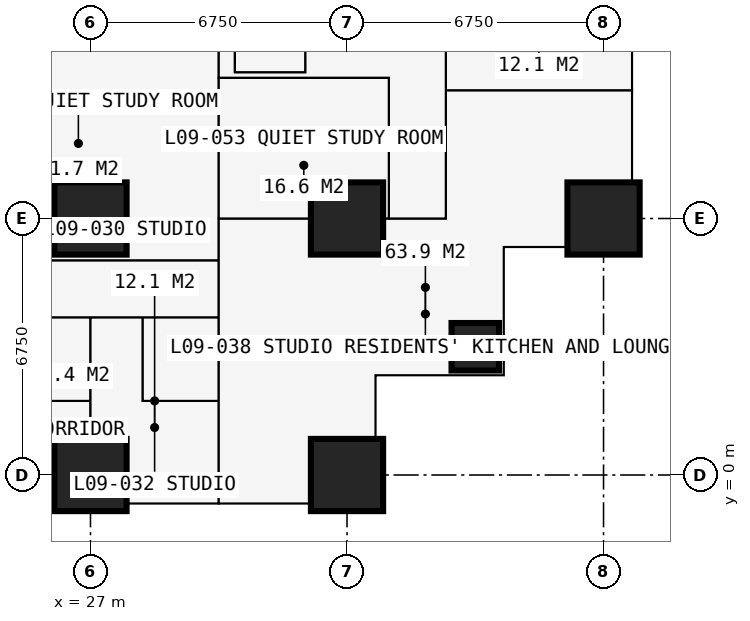
"""IFC4 building model, lengths in metres.
Left out: names, types, materials, properties, quantities, classifications, styles, units other than length and angle.
Written with IfcOpenShell. Run it as: python <this file> out.ifc"""

import sys

from ifc_helpers import new_model, si_unit, direction, frame, frame_2d, origin, origin_2d, place, context, subcontext, project, spatial, rectangle, extrude, element, fill, save


model = new_model("IFC4")
c1 = context("Model", 3, precision=1e-05, world=origin(), true_north=direction((0.0, 1.0)))
c2 = subcontext(c1, "Body", "Model", "MODEL_VIEW")
j1 = project(units=[si_unit("LENGTHUNIT", "METRE"), si_unit("PLANEANGLEUNIT", "RADIAN")], contexts=[c1])
p1 = place(None, origin())
s1 = spatial("IfcSite", under=j1, at=p1, CompositionType="ELEMENT")
p2 = place(p1, origin())
s2 = spatial("IfcBuilding", under=s1, at=p2, CompositionType="ELEMENT")
p3 = place(p2, frame((0.0, 0.0, 36.0)))
s3 = spatial("IfcBuildingStorey", under=s2, at=p3, CompositionType="ELEMENT", Elevation=36.0)
for number, where, z_axis, x_axis in (
    (1, (27.0, 0.0, 0.0), (0.0, 0.0, 1.0), (1.0, 0.0, 0.0)),
    (2, (27.0, 6.75, 0.0), (0.0, 0.0, 1.0), (1.0, 0.0, 0.0)),
    (3, (33.75, 0.0, 0.0), (0.0, 0.0, 1.0), (1.0, 0.0, 0.0)),
    (4, (33.75, 6.75, 0.0), (0.0, 0.0, 1.0), (1.0, 0.0, 0.0)),
):
    element("IfcColumn", number, at=place(p3, frame(where, z_axis=z_axis, x_axis=x_axis)), inside=s3, PredefinedType="COLUMN", context=c2, shape_type="SweptSolid", body=[
        extrude(rectangle(XDim=1.9, YDim=1.9, at=origin_2d()), origin(), (0.0, 0.0, 1.0), 3.6),
    ])
p4 = place(p3, frame((37.125, 3.375, 0.0), z_axis=(0.0, 0.0, 1.0), x_axis=(1.0, 0.0, 0.0)))
e5 = element("IfcColumn", 5, at=p4, inside=s3, PredefinedType="COLUMN", context=c2, shape_type="SweptSolid", body=[
    extrude(rectangle(XDim=1.25, YDim=1.25, at=origin_2d()), origin(), (0.0, 0.0, 1.0), 3.6),
])
p5 = place(p3, frame((40.5, 6.75, 0.0), z_axis=(0.0, 0.0, 1.0), x_axis=(1.0, 0.0, 0.0)))
e6 = element("IfcColumn", 6, at=p5, inside=s3, PredefinedType="COLUMN", context=c2, shape_type="SweptSolid", body=[
    extrude(rectangle(XDim=1.9, YDim=1.9, at=origin_2d()), origin(), (0.0, 0.0, 1.0), 3.6),
])
p6 = place(p3, frame((27.0, -0.75, 0.0), z_axis=(0.0, 0.0, 1.0), x_axis=(-1.0, 0.0, 0.0)))
e7 = element("IfcWall", 7, at=p6, inside=s3, PredefinedType="SOLIDWALL", context=c2, shape_type="SweptSolid", body=[
    extrude(rectangle(XDim=6.75, YDim=0.15, at=frame_2d((3.375, 0.0))), origin(), (0.0, 0.0, 1.0), 3.375),
])
p7 = place(p6, frame((0.996, 0.0, 0.0)))
e8 = element("IfcOpeningElement", 8, at=p7, cuts=e7, PredefinedType="OPENING", context=c2, shape_type="SweptSolid", body=[
    extrude(rectangle(XDim=1.0, YDim=2.2, at=frame_2d((0.5, 1.1))), frame((0.0, 0.085, 0.0), z_axis=(0.0, -1.0, 0.0), x_axis=(1.0, 0.0, 0.0)), (0.0, 0.0, 1.0), 0.17),
])
p8 = place(p6, frame((2.042, 0.0, 0.9)))
e9 = element("IfcOpeningElement", 9, at=p8, cuts=e7, PredefinedType="OPENING", context=c2, shape_type="SweptSolid", body=[
    extrude(rectangle(XDim=1.2, YDim=1.8, at=frame_2d((0.6, 0.9))), frame((0.0, 0.085, 0.0), z_axis=(0.0, -1.0, 0.0), x_axis=(1.0, 0.0, 0.0)), (0.0, 0.0, 1.0), 0.17),
])
p9 = place(p6, frame((4.754, 0.0, 0.0)))
e10 = element("IfcOpeningElement", 10, at=p9, cuts=e7, PredefinedType="OPENING", context=c2, shape_type="SweptSolid", body=[
    extrude(rectangle(XDim=1.0, YDim=2.2, at=frame_2d((0.5, 1.1))), frame((0.0, 0.085, 0.0), z_axis=(0.0, -1.0, 0.0), x_axis=(1.0, 0.0, 0.0)), (0.0, 0.0, 1.0), 0.17),
])
p10 = place(p6, frame((3.508, 0.0, 0.9)))
e11 = element("IfcOpeningElement", 11, at=p10, cuts=e7, PredefinedType="OPENING", context=c2, shape_type="SweptSolid", body=[
    extrude(rectangle(XDim=1.2, YDim=1.8, at=frame_2d((0.6, 0.9))), frame((0.0, 0.085, 0.0), z_axis=(0.0, -1.0, 0.0), x_axis=(1.0, 0.0, 0.0)), (0.0, 0.0, 1.0), 0.17),
])
p11 = place(p3, frame((34.5, -0.75, 0.0), z_axis=(0.0, 0.0, 1.0), x_axis=(0.0, 1.0, 0.0)))
e12 = element("IfcWall", 12, at=p11, inside=s3, PredefinedType="SOLIDWALL", context=c2, shape_type="SweptSolid", body=[
    extrude(rectangle(XDim=3.375, YDim=0.3, at=frame_2d((1.688, 0.0))), origin(), (0.0, 0.0, 1.0), 3.375),
])
p12 = place(p11, frame((1.857, 0.0, 0.9)))
e13 = element("IfcOpeningElement", 13, at=p12, cuts=e12, PredefinedType="OPENING", context=c2, shape_type="SweptSolid", body=[
    extrude(rectangle(XDim=1.2, YDim=1.8, at=frame_2d((0.6, 0.9))), frame((0.0, 0.16, 0.0), z_axis=(0.0, -1.0, 0.0), x_axis=(1.0, 0.0, 0.0)), (0.0, 0.0, 1.0), 0.32),
])
p13 = place(p3, frame((34.5, 2.625, 0.0), z_axis=(0.0, 0.0, 1.0), x_axis=(1.0, 0.0, 0.0)))
e14 = element("IfcWall", 14, at=p13, inside=s3, PredefinedType="SOLIDWALL", context=c2, shape_type="SweptSolid", body=[
    extrude(rectangle(XDim=3.375, YDim=0.3, at=frame_2d((1.688, 0.0))), origin(), (0.0, 0.0, 1.0), 3.375),
])
p14 = place(p13, frame((0.788, 0.0, 0.6)))
e15 = element("IfcOpeningElement", 15, at=p14, cuts=e14, PredefinedType="OPENING", context=c2, shape_type="SweptSolid", body=[
    extrude(rectangle(XDim=1.8, YDim=2.1, at=frame_2d((0.9, 1.05))), frame((0.0, 0.16, 0.0), z_axis=(0.0, -1.0, 0.0), x_axis=(1.0, 0.0, 0.0)), (0.0, 0.0, 1.0), 0.32),
])
p15 = place(p3, frame((37.875, 2.625, 0.0), z_axis=(0.0, 0.0, 1.0), x_axis=(0.0, 1.0, 0.0)))
e16 = element("IfcWall", 16, at=p15, inside=s3, PredefinedType="SOLIDWALL", context=c2, shape_type="SweptSolid", body=[
    extrude(rectangle(XDim=3.375, YDim=0.3, at=frame_2d((1.688, 0.0))), origin(), (0.0, 0.0, 1.0), 3.375),
])
p16 = place(p15, frame((0.788, 0.0, 0.6)))
e17 = element("IfcOpeningElement", 17, at=p16, cuts=e16, PredefinedType="OPENING", context=c2, shape_type="SweptSolid", body=[
    extrude(rectangle(XDim=1.8, YDim=2.1, at=frame_2d((0.9, 1.05))), frame((0.0, 0.16, 0.0), z_axis=(0.0, -1.0, 0.0), x_axis=(1.0, 0.0, 0.0)), (0.0, 0.0, 1.0), 0.32),
])
p17 = place(p3, frame((37.875, 6.0, 0.0), z_axis=(0.0, 0.0, 1.0), x_axis=(1.0, 0.0, 0.0)))
e18 = element("IfcWall", 18, at=p17, inside=s3, PredefinedType="SOLIDWALL", context=c2, shape_type="SweptSolid", body=[
    extrude(rectangle(XDim=3.375, YDim=0.3, at=frame_2d((1.688, 0.0))), origin(), (0.0, 0.0, 1.0), 3.375),
])
p18 = place(p17, frame((0.317, 0.0, 0.9)))
e19 = element("IfcOpeningElement", 19, at=p18, cuts=e18, PredefinedType="OPENING", context=c2, shape_type="SweptSolid", body=[
    extrude(rectangle(XDim=1.2, YDim=1.8, at=frame_2d((0.6, 0.9))), frame((0.0, 0.16, 0.0), z_axis=(0.0, -1.0, 0.0), x_axis=(1.0, 0.0, 0.0)), (0.0, 0.0, 1.0), 0.32),
])
p19 = place(p3, frame((6.75, 4.15, 0.0), z_axis=(0.0, 0.0, 1.0), x_axis=(1.0, 0.0, 0.0)))
e20 = element("IfcWall", 20, at=p19, inside=s3, PredefinedType="PARTITIONING", context=c2, shape_type="SweptSolid", body=[
    extrude(rectangle(XDim=23.625, YDim=0.1, at=frame_2d((11.812, 0.0))), origin(), (0.0, 0.0, 1.0), 3.375),
])
p20 = place(p19, frame((0.2, 0.0, 0.0)))
e21 = element("IfcOpeningElement", 21, at=p20, cuts=e20, PredefinedType="OPENING", context=c2, shape_type="SweptSolid", body=[
    extrude(rectangle(XDim=0.95, YDim=2.2, at=frame_2d((0.475, 1.1))), frame((0.0, 0.06, 0.0), z_axis=(0.0, -1.0, 0.0), x_axis=(1.0, 0.0, 0.0)), (0.0, 0.0, 1.0), 0.12),
])
p21 = place(p19, frame((3.625, 0.0, 0.0)))
e22 = element("IfcOpeningElement", 22, at=p21, cuts=e20, PredefinedType="OPENING", context=c2, shape_type="SweptSolid", body=[
    extrude(rectangle(XDim=0.95, YDim=2.2, at=frame_2d((0.475, 1.1))), frame((0.0, 0.06, 0.0), z_axis=(0.0, -1.0, 0.0), x_axis=(1.0, 0.0, 0.0)), (0.0, 0.0, 1.0), 0.12),
])
p22 = place(p19, frame((7.0, 0.0, 0.0)))
e23 = element("IfcOpeningElement", 23, at=p22, cuts=e20, PredefinedType="OPENING", context=c2, shape_type="SweptSolid", body=[
    extrude(rectangle(XDim=0.95, YDim=2.2, at=frame_2d((0.475, 1.1))), frame((0.0, 0.06, 0.0), z_axis=(0.0, -1.0, 0.0), x_axis=(1.0, 0.0, 0.0)), (0.0, 0.0, 1.0), 0.12),
])
p23 = place(p19, frame((10.325, 0.0, 0.0)))
e24 = element("IfcOpeningElement", 24, at=p23, cuts=e20, PredefinedType="OPENING", context=c2, shape_type="SweptSolid", body=[
    extrude(rectangle(XDim=0.95, YDim=2.2, at=frame_2d((0.475, 1.1))), frame((0.0, 0.06, 0.0), z_axis=(0.0, -1.0, 0.0), x_axis=(1.0, 0.0, 0.0)), (0.0, 0.0, 1.0), 0.12),
])
p24 = place(p19, frame((13.75, 0.0, 0.0)))
e25 = element("IfcOpeningElement", 25, at=p24, cuts=e20, PredefinedType="OPENING", context=c2, shape_type="SweptSolid", body=[
    extrude(rectangle(XDim=0.95, YDim=2.2, at=frame_2d((0.475, 1.1))), frame((0.0, 0.06, 0.0), z_axis=(0.0, -1.0, 0.0), x_axis=(1.0, 0.0, 0.0)), (0.0, 0.0, 1.0), 0.12),
])
p25 = place(p19, frame((17.125, 0.0, 0.0)))
e26 = element("IfcOpeningElement", 26, at=p25, cuts=e20, PredefinedType="OPENING", context=c2, shape_type="SweptSolid", body=[
    extrude(rectangle(XDim=0.95, YDim=2.2, at=frame_2d((0.475, 1.1))), frame((0.0, 0.06, 0.0), z_axis=(0.0, -1.0, 0.0), x_axis=(1.0, 0.0, 0.0)), (0.0, 0.0, 1.0), 0.12),
])
p26 = place(p19, frame((20.5, 0.0, 0.0)))
e27 = element("IfcOpeningElement", 27, at=p26, cuts=e20, PredefinedType="OPENING", context=c2, shape_type="SweptSolid", body=[
    extrude(rectangle(XDim=0.95, YDim=2.2, at=frame_2d((0.475, 1.1))), frame((0.0, 0.06, 0.0), z_axis=(0.0, -1.0, 0.0), x_axis=(1.0, 0.0, 0.0)), (0.0, 0.0, 1.0), 0.12),
])
p27 = place(p3, frame((22.988, 5.65, 0.0), z_axis=(0.0, 0.0, 1.0), x_axis=(1.0, 0.0, 0.0)))
e28 = element("IfcWall", 28, at=p27, inside=s3, PredefinedType="PARTITIONING", context=c2, shape_type="SweptSolid", body=[
    extrude(rectangle(XDim=7.387, YDim=0.15, at=frame_2d((3.694, 0.0))), origin(), (0.0, 0.0, 1.0), 3.375),
])
p28 = place(p27, frame((2.1, 0.0, 0.0)))
e29 = element("IfcOpeningElement", 29, at=p28, cuts=e28, PredefinedType="OPENING", context=c2, shape_type="SweptSolid", body=[
    extrude(rectangle(XDim=0.95, YDim=2.2, at=frame_2d((0.475, 1.1))), frame((0.0, 0.085, 0.0), z_axis=(0.0, -1.0, 0.0), x_axis=(1.0, 0.0, 0.0)), (0.0, 0.0, 1.0), 0.17),
])
p29 = place(p3, frame((25.0, 1.95, 0.0), z_axis=(0.0, 0.0, 1.0), x_axis=(1.0, 0.0, 0.0)))
e30 = element("IfcWall", 30, at=p29, inside=s3, PredefinedType="PARTITIONING", context=c2, shape_type="SweptSolid", body=[
    extrude(rectangle(XDim=2.0, YDim=0.1, at=frame_2d((1.0, 0.0))), origin(), (0.0, 0.0, 1.0), 3.375),
])
p30 = place(p3, frame((27.0, -0.734, 0.0), z_axis=(0.0, 0.0, 1.0), x_axis=(0.0, 1.0, 0.0)))
e31 = element("IfcWall", 31, at=p30, inside=s3, PredefinedType="PARTITIONING", context=c2, shape_type="SweptSolid", body=[
    extrude(rectangle(XDim=4.884, YDim=0.175, at=frame_2d((2.442, 0.0))), origin(), (0.0, 0.0, 1.0), 2.877),
])
p31 = place(p3, frame((28.375, 1.95, 0.0), z_axis=(0.0, 0.0, 1.0), x_axis=(0.0, 1.0, 0.0)))
e32 = element("IfcWall", 32, at=p31, inside=s3, PredefinedType="PARTITIONING", context=c2, shape_type="SweptSolid", body=[
    extrude(rectangle(XDim=2.2, YDim=0.1, at=frame_2d((1.1, 0.0))), origin(), (0.0, 0.0, 1.0), 3.375),
])
p32 = place(p31, frame((0.65, 0.0, 0.0)))
e33 = element("IfcOpeningElement", 33, at=p32, cuts=e32, PredefinedType="OPENING", context=c2, shape_type="SweptSolid", body=[
    extrude(rectangle(XDim=0.9, YDim=2.2, at=frame_2d((0.45, 1.1))), frame((0.0, 0.06, 0.0), z_axis=(0.0, -1.0, 0.0), x_axis=(1.0, 0.0, 0.0)), (0.0, 0.0, 1.0), 0.12),
])
p33 = place(p3, frame((28.375, 1.95, 0.0), z_axis=(0.0, 0.0, 1.0), x_axis=(1.0, 0.0, 0.0)))
e34 = element("IfcWall", 34, at=p33, inside=s3, PredefinedType="PARTITIONING", context=c2, shape_type="SweptSolid", body=[
    extrude(rectangle(XDim=2.0, YDim=0.1, at=frame_2d((1.0, 0.0))), origin(), (0.0, 0.0, 1.0), 3.375),
])
p34 = place(p3, frame((30.375, -0.734, 0.0), z_axis=(0.0, 0.0, 1.0), x_axis=(0.0, 1.0, 0.0)))
e35 = element("IfcWall", 35, at=p34, inside=s3, PredefinedType="PARTITIONING", context=c2, shape_type="SweptSolid", body=[
    extrude(rectangle(XDim=12.034, YDim=0.15, at=frame_2d((6.017, 0.0))), origin(), (0.0, 0.0, 1.0), 3.375),
])
p35 = place(p34, frame((5.134, 0.0, 0.0)))
e36 = element("IfcOpeningElement", 36, at=p35, cuts=e35, PredefinedType="OPENING", context=c2, shape_type="SweptSolid", body=[
    extrude(rectangle(XDim=1.0, YDim=2.2, at=frame_2d((0.5, 1.1))), frame((0.0, 0.085, 0.0), z_axis=(0.0, -1.0, 0.0), x_axis=(1.0, 0.0, 0.0)), (0.0, 0.0, 1.0), 0.17),
])
p36 = place(p3, frame((30.375, 6.75, 0.0), z_axis=(0.0, 0.0, 1.0), x_axis=(1.0, 0.0, 0.0)))
e37 = element("IfcWall", 37, at=p36, inside=s3, PredefinedType="PARTITIONING", context=c2, shape_type="SweptSolid", body=[
    extrude(rectangle(XDim=5.975, YDim=0.15, at=frame_2d((2.988, 0.0))), origin(), (0.0, 0.0, 1.0), 2.877),
])
p37 = place(p3, frame((30.375, 10.45, 0.0), z_axis=(0.0, 0.0, 1.0), x_axis=(1.0, 0.0, 0.0)))
e38 = element("IfcWall", 38, at=p37, inside=s3, PredefinedType="PARTITIONING", context=c2, shape_type="SweptSolid", body=[
    extrude(rectangle(XDim=4.475, YDim=0.15, at=frame_2d((2.238, 0.0))), origin(), (0.0, 0.0, 1.0), 3.375),
])
p38 = place(p37, frame((2.35, 0.0, 0.0)))
e39 = element("IfcOpeningElement", 39, at=p38, cuts=e38, PredefinedType="OPENING", context=c2, shape_type="SweptSolid", body=[
    extrude(rectangle(XDim=0.95, YDim=2.2, at=frame_2d((0.475, 1.1))), frame((0.0, 0.085, 0.0), z_axis=(0.0, -1.0, 0.0), x_axis=(1.0, 0.0, 0.0)), (0.0, 0.0, 1.0), 0.17),
])
p39 = place(p3, frame((30.8, 10.6, 0.0), z_axis=(0.0, 0.0, 1.0), x_axis=(0.0, 1.0, 0.0)))
e40 = element("IfcWall", 40, at=p39, inside=s3, PredefinedType="PARTITIONING", context=c2, shape_type="SweptSolid", body=[
    extrude(rectangle(XDim=0.7, YDim=0.15, at=frame_2d((0.35, 0.0))), origin(), (0.0, 0.0, 1.0), 3.375),
])
p40 = place(p3, frame((30.8, 10.6, 0.0), z_axis=(0.0, 0.0, 1.0), x_axis=(1.0, 0.0, 0.0)))
e41 = element("IfcWall", 41, at=p40, inside=s3, PredefinedType="PARTITIONING", context=c2, shape_type="SweptSolid", body=[
    extrude(rectangle(XDim=1.85, YDim=0.15, at=frame_2d((0.925, 0.0))), origin(), (0.0, 0.0, 1.0), 3.375),
])
p41 = place(p3, frame((32.65, 10.6, 0.0), z_axis=(0.0, 0.0, 1.0), x_axis=(0.0, 1.0, 0.0)))
e42 = element("IfcWall", 42, at=p41, inside=s3, PredefinedType="SHEAR", context=c2, shape_type="SweptSolid", body=[
    extrude(rectangle(XDim=9.3, YDim=0.1, at=frame_2d((4.65, 0.0))), origin(), (0.0, 0.0, 1.0), 3.375),
])
p42 = place(p41, frame((0.5, 0.0, 0.0)))
e43 = element("IfcOpeningElement", 43, at=p42, cuts=e42, PredefinedType="OPENING", context=c2, shape_type="SweptSolid", body=[
    extrude(rectangle(XDim=1.0, YDim=2.2, at=frame_2d((0.5, 1.1))), frame((0.0, 0.06, 0.0), z_axis=(0.0, -1.0, 0.0), x_axis=(1.0, 0.0, 0.0)), (0.0, 0.0, 1.0), 0.12),
])
p43 = place(p3, frame((34.85, 6.75, 0.0), z_axis=(0.0, 0.0, 1.0), x_axis=(0.0, 1.0, 0.0)))
e44 = element("IfcWall", 44, at=p43, inside=s3, PredefinedType="PARTITIONING", context=c2, shape_type="SweptSolid", body=[
    extrude(rectangle(XDim=3.7, YDim=0.15, at=frame_2d((1.85, 0.0))), origin(), (0.0, 0.0, 1.0), 3.375),
])
p44 = place(p3, frame((36.35, 6.75, 0.0), z_axis=(0.0, 0.0, 1.0), x_axis=(0.0, 1.0, 0.0)))
e45 = element("IfcWall", 45, at=p44, inside=s3, PredefinedType="PARTITIONING", context=c2, shape_type="SweptSolid", body=[
    extrude(rectangle(XDim=23.625, YDim=0.1, at=frame_2d((11.812, 0.0))), origin(), (0.0, 0.0, 1.0), 3.375),
])
p45 = place(p44, frame((3.575, 0.0, 0.0)))
e46 = element("IfcOpeningElement", 46, at=p45, cuts=e45, PredefinedType="OPENING", context=c2, shape_type="SweptSolid", body=[
    extrude(rectangle(XDim=0.95, YDim=2.2, at=frame_2d((0.475, 1.1))), frame((0.0, 0.06, 0.0), z_axis=(0.0, -1.0, 0.0), x_axis=(1.0, 0.0, 0.0)), (0.0, 0.0, 1.0), 0.12),
])
p46 = place(p44, frame((7.0, 0.0, 0.0)))
e47 = element("IfcOpeningElement", 47, at=p46, cuts=e45, PredefinedType="OPENING", context=c2, shape_type="SweptSolid", body=[
    extrude(rectangle(XDim=0.95, YDim=2.2, at=frame_2d((0.475, 1.1))), frame((0.0, 0.06, 0.0), z_axis=(0.0, -1.0, 0.0), x_axis=(1.0, 0.0, 0.0)), (0.0, 0.0, 1.0), 0.12),
])
p47 = place(p44, frame((10.375, 0.0, 0.0)))
e48 = element("IfcOpeningElement", 48, at=p47, cuts=e45, PredefinedType="OPENING", context=c2, shape_type="SweptSolid", body=[
    extrude(rectangle(XDim=0.95, YDim=2.2, at=frame_2d((0.475, 1.1))), frame((0.0, 0.06, 0.0), z_axis=(0.0, -1.0, 0.0), x_axis=(1.0, 0.0, 0.0)), (0.0, 0.0, 1.0), 0.12),
])
p48 = place(p44, frame((13.75, 0.0, 0.0)))
e49 = element("IfcOpeningElement", 49, at=p48, cuts=e45, PredefinedType="OPENING", context=c2, shape_type="SweptSolid", body=[
    extrude(rectangle(XDim=0.95, YDim=2.2, at=frame_2d((0.475, 1.1))), frame((0.0, 0.06, 0.0), z_axis=(0.0, -1.0, 0.0), x_axis=(1.0, 0.0, 0.0)), (0.0, 0.0, 1.0), 0.12),
])
p49 = place(p44, frame((17.125, 0.0, 0.0)))
e50 = element("IfcOpeningElement", 50, at=p49, cuts=e45, PredefinedType="OPENING", context=c2, shape_type="SweptSolid", body=[
    extrude(rectangle(XDim=0.95, YDim=2.2, at=frame_2d((0.475, 1.1))), frame((0.0, 0.06, 0.0), z_axis=(0.0, -1.0, 0.0), x_axis=(1.0, 0.0, 0.0)), (0.0, 0.0, 1.0), 0.12),
])
p50 = place(p44, frame((20.5, 0.0, 0.0)))
e51 = element("IfcOpeningElement", 51, at=p50, cuts=e45, PredefinedType="OPENING", context=c2, shape_type="SweptSolid", body=[
    extrude(rectangle(XDim=0.95, YDim=2.2, at=frame_2d((0.475, 1.1))), frame((0.0, 0.06, 0.0), z_axis=(0.0, -1.0, 0.0), x_axis=(1.0, 0.0, 0.0)), (0.0, 0.0, 1.0), 0.12),
])
p51 = place(p3, frame((36.35, 10.125, 0.0), z_axis=(0.0, 0.0, 1.0), x_axis=(1.0, 0.0, 0.0)))
e52 = element("IfcWall", 52, at=p51, inside=s3, PredefinedType="PARTITIONING", context=c2, shape_type="SweptSolid", body=[
    extrude(rectangle(XDim=4.884, YDim=0.15, at=frame_2d((2.442, 0.0))), origin(), (0.0, 0.0, 1.0), 3.375),
])
p52 = place(p7, origin())
e53 = element("IfcDoor", 53, at=p52, inside=s3, OperationType="SINGLE_SWING_LEFT", PredefinedType="DOOR", context=c2, shape_type="SweptSolid", body=[
    extrude(rectangle(XDim=1.0, YDim=2.2, at=frame_2d((0.5, 1.1))), frame((0.0, 0.025, 0.0), z_axis=(0.0, -1.0, 0.0), x_axis=(1.0, 0.0, 0.0)), (0.0, 0.0, 1.0), 0.05),
])
fill(e8, e53)
p53 = place(p12, origin())
e54 = element("IfcWindow", 54, at=p53, inside=s3, PartitioningType="SINGLE_PANEL", PredefinedType="WINDOW", context=c2, shape_type="SweptSolid", body=[
    extrude(rectangle(XDim=1.2, YDim=1.8, at=frame_2d((0.6, 0.9))), frame((0.0, 0.03, 0.0), z_axis=(0.0, -1.0, 0.0), x_axis=(1.0, 0.0, 0.0)), (0.0, 0.0, 1.0), 0.06),
])
fill(e13, e54)
p54 = place(p14, origin())
e55 = element("IfcWindow", 55, at=p54, inside=s3, PartitioningType="SINGLE_PANEL", PredefinedType="WINDOW", context=c2, shape_type="SweptSolid", body=[
    extrude(rectangle(XDim=1.8, YDim=2.1, at=frame_2d((0.9, 1.05))), frame((0.0, 0.03, 0.0), z_axis=(0.0, -1.0, 0.0), x_axis=(1.0, 0.0, 0.0)), (0.0, 0.0, 1.0), 0.06),
])
fill(e15, e55)
p55 = place(p16, origin())
e56 = element("IfcWindow", 56, at=p55, inside=s3, PartitioningType="SINGLE_PANEL", PredefinedType="WINDOW", context=c2, shape_type="SweptSolid", body=[
    extrude(rectangle(XDim=1.8, YDim=2.1, at=frame_2d((0.9, 1.05))), frame((0.0, 0.03, 0.0), z_axis=(0.0, -1.0, 0.0), x_axis=(1.0, 0.0, 0.0)), (0.0, 0.0, 1.0), 0.06),
])
fill(e17, e56)
p56 = place(p18, origin())
e57 = element("IfcWindow", 57, at=p56, inside=s3, PartitioningType="SINGLE_PANEL", PredefinedType="WINDOW", context=c2, shape_type="SweptSolid", body=[
    extrude(rectangle(XDim=1.2, YDim=1.8, at=frame_2d((0.6, 0.9))), frame((0.0, 0.03, 0.0), z_axis=(0.0, -1.0, 0.0), x_axis=(1.0, 0.0, 0.0)), (0.0, 0.0, 1.0), 0.06),
])
fill(e19, e57)
p57 = place(p26, origin())
e58 = element("IfcDoor", 58, at=p57, inside=s3, OperationType="SINGLE_SWING_LEFT", PredefinedType="DOOR", context=c2, shape_type="SweptSolid", body=[
    extrude(rectangle(XDim=0.95, YDim=2.2, at=frame_2d((0.475, 1.1))), frame((0.0, 0.025, 0.0), z_axis=(0.0, -1.0, 0.0), x_axis=(1.0, 0.0, 0.0)), (0.0, 0.0, 1.0), 0.05),
])
fill(e27, e58)
p58 = place(p32, origin())
e59 = element("IfcDoor", 59, at=p58, inside=s3, OperationType="SINGLE_SWING_RIGHT", PredefinedType="DOOR", context=c2, shape_type="SweptSolid", body=[
    extrude(rectangle(XDim=0.9, YDim=2.2, at=frame_2d((0.45, 1.1))), frame((0.0, 0.025, 0.0), z_axis=(0.0, -1.0, 0.0), x_axis=(1.0, 0.0, 0.0)), (0.0, 0.0, 1.0), 0.05),
])
fill(e33, e59)
p59 = place(p28, origin())
e60 = element("IfcDoor", 60, at=p59, inside=s3, OperationType="SINGLE_SWING_LEFT", PredefinedType="DOOR", context=c2, shape_type="SweptSolid", body=[
    extrude(rectangle(XDim=0.95, YDim=2.2, at=frame_2d((0.475, 1.1))), frame((0.0, 0.025, 0.0), z_axis=(0.0, -1.0, 0.0), x_axis=(1.0, 0.0, 0.0)), (0.0, 0.0, 1.0), 0.05),
])
fill(e29, e60)
p60 = place(p35, origin())
e61 = element("IfcDoor", 61, at=p60, inside=s3, OperationType="SINGLE_SWING_LEFT", PredefinedType="DOOR", context=c2, shape_type="SweptSolid", body=[
    extrude(rectangle(XDim=1.0, YDim=2.2, at=frame_2d((0.5, 1.1))), frame((0.0, 0.025, 0.0), z_axis=(0.0, -1.0, 0.0), x_axis=(1.0, 0.0, 0.0)), (0.0, 0.0, 1.0), 0.05),
])
fill(e36, e61)
p61 = place(p45, origin())
e62 = element("IfcDoor", 62, at=p61, inside=s3, OperationType="SINGLE_SWING_LEFT", PredefinedType="DOOR", context=c2, shape_type="SweptSolid", body=[
    extrude(rectangle(XDim=0.95, YDim=2.2, at=frame_2d((0.475, 1.1))), frame((0.0, 0.025, 0.0), z_axis=(0.0, -1.0, 0.0), x_axis=(1.0, 0.0, 0.0)), (0.0, 0.0, 1.0), 0.05),
])
fill(e46, e62)
p62 = place(p42, origin())
e63 = element("IfcDoor", 63, at=p62, inside=s3, OperationType="SINGLE_SWING_LEFT", PredefinedType="DOOR", context=c2, shape_type="SweptSolid", body=[
    extrude(rectangle(XDim=1.0, YDim=2.2, at=frame_2d((0.5, 1.1))), frame((0.0, 0.025, 0.0), z_axis=(0.0, -1.0, 0.0), x_axis=(1.0, 0.0, 0.0)), (0.0, 0.0, 1.0), 0.05),
])
fill(e43, e63)
p63 = place(p38, origin())
e64 = element("IfcDoor", 64, at=p63, inside=s3, OperationType="SINGLE_SWING_LEFT", PredefinedType="DOOR", context=c2, shape_type="SweptSolid", body=[
    extrude(rectangle(XDim=0.95, YDim=2.2, at=frame_2d((0.475, 1.1))), frame((0.0, 0.025, 0.0), z_axis=(0.0, -1.0, 0.0), x_axis=(1.0, 0.0, 0.0)), (0.0, 0.0, 1.0), 0.05),
])
fill(e39, e64)
save(model, sys.argv[1])
